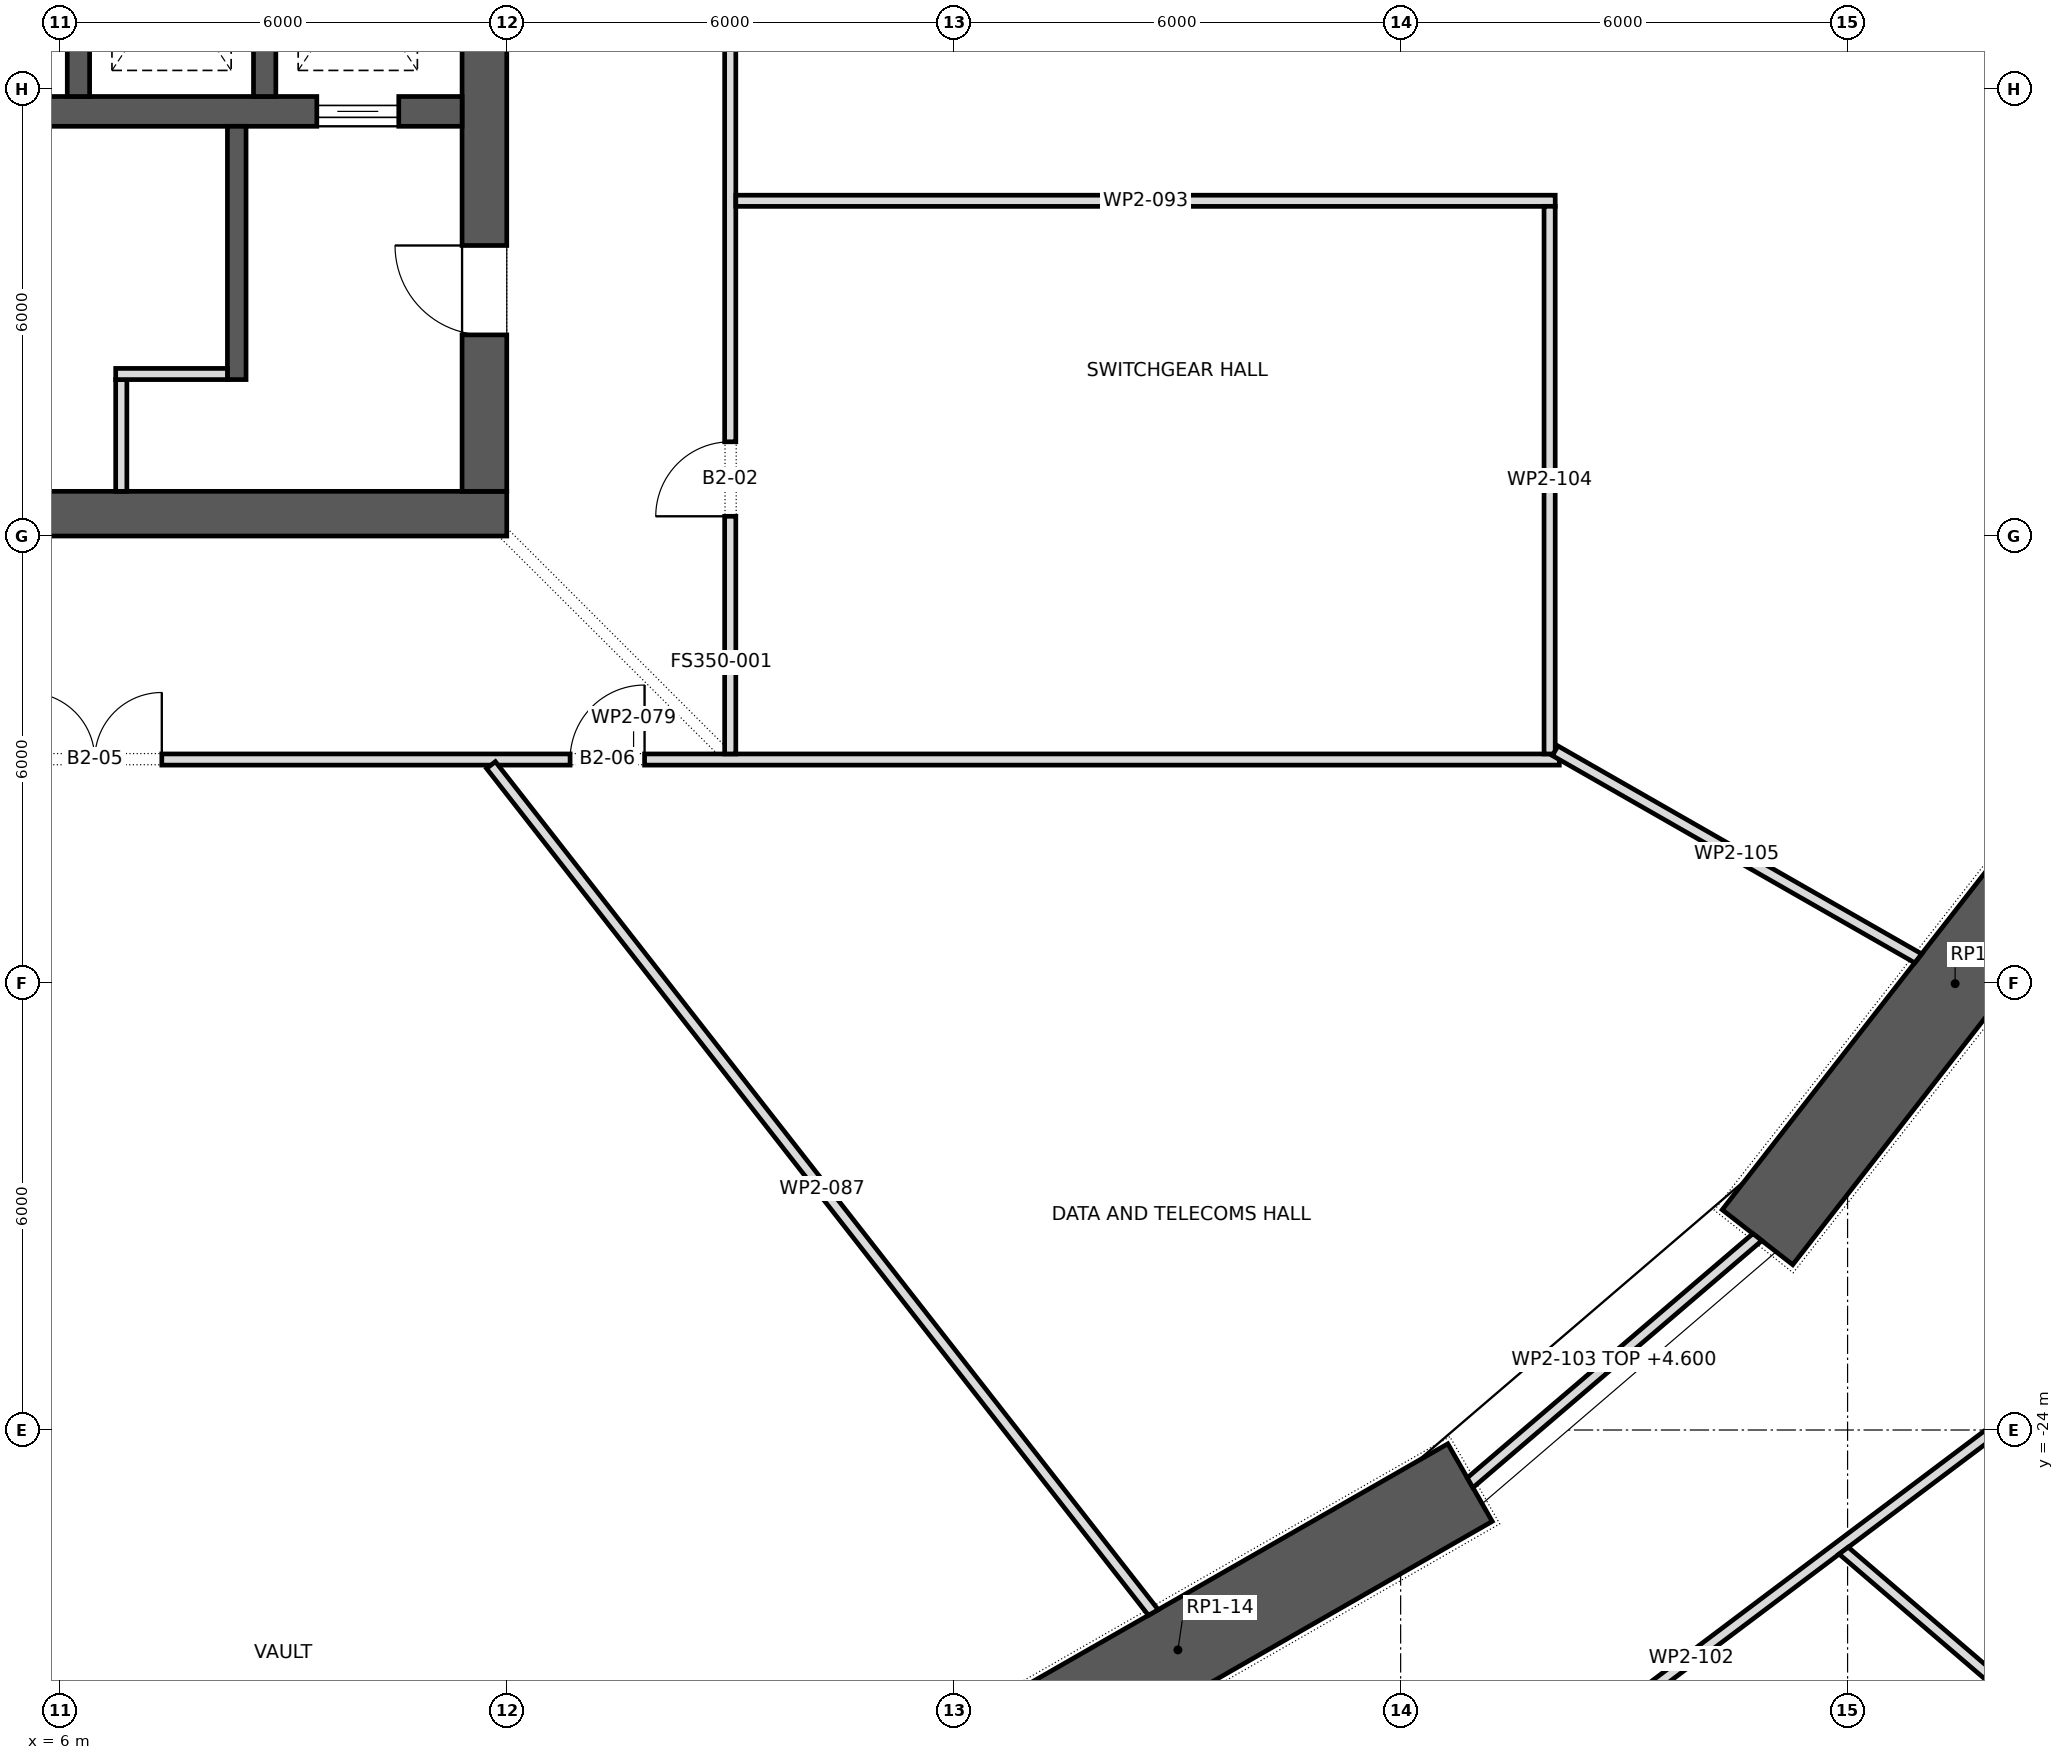
"""IFC4 building model, lengths in metres.
Left out: names, types, materials, properties, quantities, classifications, styles, units other than length and angle.
Written with IfcOpenShell. Run it as: python <this file> out.ifc"""

import sys

from ifc_helpers import new_model, si_unit, direction, frame, frame_2d, origin, place, context, subcontext, project, spatial, polyline, rectangle, outline, extrude, element, fill, save


model = new_model("IFC4")
c1 = context("Model", 3, precision=1e-05, world=origin(), true_north=direction((0.0, 1.0)))
c2 = subcontext(c1, "Body", "Model", "MODEL_VIEW")
j1 = project(units=[si_unit("LENGTHUNIT", "METRE"), si_unit("PLANEANGLEUNIT", "RADIAN")], contexts=[c1])
p1 = place(None, origin())
s1 = spatial("IfcSite", under=j1, at=p1, CompositionType="ELEMENT")
p2 = place(p1, origin())
s2 = spatial("IfcBuilding", under=s1, at=p2, CompositionType="ELEMENT")
p3 = place(p2, frame((0.0, 0.0, -9.5)))
s3 = spatial("IfcBuildingStorey", under=s2, at=p3, CompositionType="ELEMENT", Elevation=-9.5)
p4 = place(p3, frame((17.089, -29.198, 0.0), z_axis=(0.0, 0.0, 1.0), x_axis=(0.867760656864, 0.496982336103, 0.0)))
e1 = element("IfcWall", 1, at=p4, inside=s3, PredefinedType="SHEAR", context=c2, shape_type="SweptSolid", body=[
    extrude(rectangle(XDim=9.038, YDim=1.2, at=frame_2d((4.519, 0.0))), origin(), (0.0, 0.0, 1.0), 5.5),
])
p5 = place(p3, frame((28.79, -21.412, 0.0), z_axis=(0.0, 0.0, 1.0), x_axis=(0.614825322247, 0.788663314174, 0.0)))
e2 = element("IfcWall", 2, at=p5, inside=s3, PredefinedType="SHEAR", context=c2, shape_type="SweptSolid", body=[
    extrude(rectangle(XDim=8.632, YDim=1.2, at=frame_2d((4.316, 0.0))), origin(), (0.0, 0.0, 1.0), 5.5),
])
p6 = place(p3, frame((-12.0, -11.7, 0.0), z_axis=(0.0, 0.0, 1.0), x_axis=(1.0, 0.0, 0.0)))
e3 = element("IfcWall", 3, at=p6, inside=s3, PredefinedType="SHEAR", context=c2, shape_type="SweptSolid", body=[
    extrude(rectangle(XDim=24.0, YDim=0.6, at=frame_2d((12.0, 0.0))), origin(), (0.0, 0.0, 1.0), 5.5),
])
p7 = place(p6, frame((11.6, 0.0, 0.0)))
e4 = element("IfcOpeningElement", 4, at=p7, cuts=e3, PredefinedType="OPENING", context=c2, shape_type="SweptSolid", body=[
    extrude(rectangle(XDim=0.8, YDim=2.1, at=frame_2d((0.4, 1.05))), frame((0.0, 0.312, 0.0), z_axis=(0.0, -1.0, 0.0), x_axis=(1.0, 0.0, 0.0)), (0.0, 0.0, 1.0), 0.624),
])
p8 = place(p3, frame((11.7, -11.4, 0.0), z_axis=(0.0, 0.0, 1.0), x_axis=(0.0, 1.0, 0.0)))
e5 = element("IfcWall", 5, at=p8, inside=s3, PredefinedType="SHEAR", context=c2, shape_type="SweptSolid", body=[
    extrude(rectangle(XDim=22.8, YDim=0.6, at=frame_2d((11.4, 0.0))), origin(), (0.0, 0.0, 1.0), 5.5),
])
p9 = place(p8, frame((10.2, 0.0, 0.0)))
e6 = element("IfcOpeningElement", 6, at=p9, cuts=e5, PredefinedType="OPENING", context=c2, shape_type="SweptSolid", body=[
    extrude(rectangle(XDim=2.4, YDim=2.1, at=frame_2d((1.2, 1.05))), frame((0.0, 0.312, 0.0), z_axis=(0.0, -1.0, 0.0), x_axis=(1.0, 0.0, 0.0)), (0.0, 0.0, 1.0), 0.624),
])
p10 = place(p8, frame((19.5, 0.0, 0.0)))
e7 = element("IfcOpeningElement", 7, at=p10, cuts=e5, PredefinedType="OPENING", context=c2, shape_type="SweptSolid", body=[
    extrude(rectangle(XDim=1.2, YDim=2.1, at=frame_2d((0.6, 1.05))), frame((0.0, 0.312, 0.0), z_axis=(0.0, -1.0, 0.0), x_axis=(1.0, 0.0, 0.0)), (0.0, 0.0, 1.0), 0.624),
])
p11 = place(p8, frame((2.1, 0.0, 0.0)))
e8 = element("IfcOpeningElement", 8, at=p11, cuts=e5, PredefinedType="OPENING", context=c2, shape_type="SweptSolid", body=[
    extrude(rectangle(XDim=1.2, YDim=2.1, at=frame_2d((0.6, 1.05))), frame((0.0, 0.312, 0.0), z_axis=(0.0, -1.0, 0.0), x_axis=(1.0, 0.0, 0.0)), (0.0, 0.0, 1.0), 0.624),
])
p12 = place(p3, frame((-11.4, -6.3, 0.0), z_axis=(0.0, 0.0, 1.0), x_axis=(1.0, 0.0, 0.0)))
e9 = element("IfcWall", 9, at=p12, inside=s3, PredefinedType="SHEAR", context=c2, shape_type="SweptSolid", body=[
    extrude(rectangle(XDim=22.8, YDim=0.4, at=frame_2d((11.4, 0.0))), origin(), (0.0, 0.0, 1.0), 5.5),
])
p13 = place(p12, frame((20.85, 0.0, 0.0)))
e10 = element("IfcOpeningElement", 10, at=p13, cuts=e9, PredefinedType="OPENING", context=c2, shape_type="SweptSolid", body=[
    extrude(rectangle(XDim=1.1, YDim=2.1, at=frame_2d((0.55, 1.05))), frame((0.0, 0.212, 0.0), z_axis=(0.0, -1.0, 0.0), x_axis=(1.0, 0.0, 0.0)), (0.0, 0.0, 1.0), 0.424),
])
for number, where, z_axis, x_axis in (
    (11, (6.25, -6.1, 0.0), (0.0, 0.0, 1.0), (0.0, 1.0, 0.0)),
    (12, (8.75, -6.1, 0.0), (0.0, 0.0, 1.0), (0.0, 1.0, 0.0)),
):
    element("IfcWall", number, at=place(p3, frame(where, z_axis=z_axis, x_axis=x_axis)), inside=s3, PredefinedType="SHEAR", context=c2, shape_type="SweptSolid", body=[
        extrude(rectangle(XDim=2.9, YDim=0.3, at=frame_2d((1.45, 0.0))), origin(), (0.0, 0.0, 1.0), 5.5),
    ])
p14 = place(p3, frame((8.375, -9.9, 0.0), z_axis=(0.0, 0.0, 1.0), x_axis=(0.0, 1.0, 0.0)))
e13 = element("IfcWall", 13, at=p14, inside=s3, PredefinedType="SHEAR", context=c2, shape_type="SweptSolid", body=[
    extrude(rectangle(XDim=3.4, YDim=0.25, at=frame_2d((1.7, 0.0))), origin(), (0.0, 0.0, 1.0), 5.05),
])
for number, where, z_axis, x_axis in (
    (14, (6.825, -11.4, 0.0), (0.0, 0.0, 1.0), (0.0, 1.0, 0.0)),
    (15, (6.75, -9.825, 0.0), (0.0, 0.0, 1.0), (1.0, 0.0, 0.0)),
):
    element("IfcWall", number, at=place(p3, frame(where, z_axis=z_axis, x_axis=x_axis)), inside=s3, PredefinedType="PARTITIONING", context=c2, shape_type="SweptSolid", body=[
        extrude(rectangle(XDim=1.5, YDim=0.15, at=frame_2d((0.75, 0.0))), origin(), (0.0, 0.0, 1.0), 5.05),
    ])
p15 = place(p3, frame((1.275, -15.0, 0.0), z_axis=(0.0, 0.0, 1.0), x_axis=(1.0, 0.0, 0.0)))
e16 = element("IfcWall", 16, at=p15, inside=s3, PredefinedType="PARTITIONING", context=c2, shape_type="SweptSolid", body=[
    extrude(rectangle(XDim=24.855, YDim=0.15, at=frame_2d((12.427, 0.0))), origin(), (0.0, 0.0, 1.0), 5.05),
])
p16 = place(p15, frame((4.294, 0.0, 0.0)))
e17 = element("IfcOpeningElement", 17, at=p16, cuts=e16, PredefinedType="OPENING", context=c2, shape_type="SweptSolid", body=[
    extrude(rectangle(XDim=1.8, YDim=2.1, at=frame_2d((0.9, 1.05))), frame((0.0, 0.087, 0.0), z_axis=(0.0, -1.0, 0.0), x_axis=(1.0, 0.0, 0.0)), (0.0, 0.0, 1.0), 0.174),
])
p17 = place(p15, frame((11.575, 0.0, 0.0)))
e18 = element("IfcOpeningElement", 18, at=p17, cuts=e16, PredefinedType="OPENING", context=c2, shape_type="SweptSolid", body=[
    extrude(rectangle(XDim=1.0, YDim=2.1, at=frame_2d((0.5, 1.05))), frame((0.0, 0.087, 0.0), z_axis=(0.0, -1.0, 0.0), x_axis=(1.0, 0.0, 0.0)), (0.0, 0.0, 1.0), 0.174),
])
p18 = place(p3, frame((11.788, -15.074, 0.0), z_axis=(0.0, 0.0, 1.0), x_axis=(0.615848120598, -0.787864894735, 0.0)))
e19 = element("IfcWall", 19, at=p18, inside=s3, PredefinedType="PARTITIONING", context=c2, shape_type="SweptSolid", body=[
    extrude(outline(polyline([(0.0, -0.075), (14.428, -0.075), (14.449, 0.075), (0.0, 0.075), (0.0, -0.075)])), origin(), (0.0, 0.0, 1.0), 5.05),
])
p19 = place(p3, frame((15.0, -14.925, 0.0), z_axis=(0.0, 0.0, 1.0), x_axis=(0.0, 1.0, 0.0)))
e20 = element("IfcWall", 20, at=p19, inside=s3, PredefinedType="PARTITIONING", context=c2, shape_type="SweptSolid", body=[
    extrude(rectangle(XDim=29.85, YDim=0.15, at=frame_2d((14.925, 0.0))), origin(), (0.0, 0.0, 1.0), 5.05),
])
p20 = place(p19, frame((25.66, 0.0, 0.0)))
e21 = element("IfcOpeningElement", 21, at=p20, cuts=e20, PredefinedType="OPENING", context=c2, shape_type="SweptSolid", body=[
    extrude(rectangle(XDim=1.0, YDim=2.1, at=frame_2d((0.5, 1.05))), frame((0.0, 0.087, 0.0), z_axis=(0.0, -1.0, 0.0), x_axis=(1.0, 0.0, 0.0)), (0.0, 0.0, 1.0), 0.174),
])
p21 = place(p19, frame((3.19, 0.0, 0.0)))
e22 = element("IfcOpeningElement", 22, at=p21, cuts=e20, PredefinedType="OPENING", context=c2, shape_type="SweptSolid", body=[
    extrude(rectangle(XDim=1.0, YDim=2.1, at=frame_2d((0.5, 1.05))), frame((0.0, 0.087, 0.0), z_axis=(0.0, -1.0, 0.0), x_axis=(1.0, 0.0, 0.0)), (0.0, 0.0, 1.0), 0.174),
])
p22 = place(p19, frame((13.725, 0.0, 0.0)))
e23 = element("IfcOpeningElement", 23, at=p22, cuts=e20, PredefinedType="OPENING", context=c2, shape_type="SweptSolid", body=[
    extrude(rectangle(XDim=2.4, YDim=2.1, at=frame_2d((1.2, 1.05))), frame((0.0, 0.087, 0.0), z_axis=(0.0, -1.0, 0.0), x_axis=(1.0, 0.0, 0.0)), (0.0, 0.0, 1.0), 0.174),
])
p23 = place(p3, frame((15.075, -7.5, 0.0), z_axis=(0.0, 0.0, 1.0), x_axis=(1.0, 0.0, 0.0)))
e24 = element("IfcWall", 24, at=p23, inside=s3, PredefinedType="PARTITIONING", context=c2, shape_type="SweptSolid", body=[
    extrude(rectangle(XDim=11.0, YDim=0.15, at=frame_2d((5.5, 0.0))), origin(), (0.0, 0.0, 1.0), 5.05),
])
p24 = place(p3, frame((23.696, -30.228, 0.0), z_axis=(0.0, 0.0, 1.0), x_axis=(0.799195100787, 0.601071701944, 0.0)))
e25 = element("IfcWall", 25, at=p24, inside=s3, PredefinedType="PARTITIONING", context=c2, shape_type="SweptSolid", body=[
    extrude(rectangle(XDim=10.529, YDim=0.15, at=frame_2d((5.264, 0.0))), origin(), (0.0, 0.0, 1.0), 5.05),
])
p25 = place(p3, frame((24.932, -24.708, 0.0), z_axis=(0.0, 0.0, 1.0), x_axis=(0.760084552743, 0.649824185978, 0.0)))
e26 = element("IfcWall", 26, at=p25, inside=s3, PredefinedType="PARTITIONING", context=c2, shape_type="SweptSolid", body=[
    extrude(outline(polyline([(-0.014, -0.075), (5.09, -0.075), (5.06, 0.075), (0.014, 0.075), (-0.014, -0.075)])), origin(), (0.0, 0.0, 1.0), 4.6),
])
p26 = place(p3, frame((26.0, -14.925, 0.0), z_axis=(0.0, 0.0, 1.0), x_axis=(0.0, 1.0, 0.0)))
e27 = element("IfcWall", 27, at=p26, inside=s3, PredefinedType="PARTITIONING", context=c2, shape_type="SweptSolid", body=[
    extrude(rectangle(XDim=7.351, YDim=0.15, at=frame_2d((3.676, 0.0))), origin(), (0.0, 0.0, 1.0), 5.05),
])
p27 = place(p3, frame((26.074, -14.882, 0.0), z_axis=(0.0, 0.0, 1.0), x_axis=(0.868133416031, -0.496330909746, 0.0)))
e28 = element("IfcWall", 28, at=p27, inside=s3, PredefinedType="PARTITIONING", context=c2, shape_type="SweptSolid", body=[
    extrude(outline(polyline([(0.0, -0.075), (5.604, -0.075), (5.626, 0.075), (0.0, 0.075), (0.0, -0.075)])), origin(), (0.0, 0.0, 1.0), 5.05),
])
p28 = place(p3, frame((29.947, -25.619, 0.0), z_axis=(0.0, 0.0, 1.0), x_axis=(0.759265306208, -0.650781218836, 0.0)))
e29 = element("IfcWall", 29, at=p28, inside=s3, PredefinedType="PARTITIONING", context=c2, shape_type="SweptSolid", body=[
    extrude(outline(polyline([(-0.017, -0.075), (9.888, -0.075), (9.911, 0.075), (0.017, 0.075), (-0.017, -0.075)])), origin(), (0.0, 0.0, 1.0), 5.05),
])
p29 = place(p13, origin())
e30 = element("IfcDoor", 30, at=p29, inside=s3, OperationType="SLIDING_TO_LEFT", PredefinedType="DOOR", context=c2, shape_type="SweptSolid", body=[
    extrude(rectangle(XDim=1.1, YDim=2.1, at=frame_2d((0.55, 1.05))), frame((0.0, 0.025, 0.0), z_axis=(0.0, -1.0, 0.0), x_axis=(1.0, 0.0, 0.0)), (0.0, 0.0, 1.0), 0.05),
])
fill(e10, e30)
p30 = place(p11, origin())
e31 = element("IfcDoor", 31, at=p30, inside=s3, OperationType="SINGLE_SWING_LEFT", PredefinedType="DOOR", context=c2, shape_type="SweptSolid", body=[
    extrude(rectangle(XDim=1.2, YDim=2.1, at=frame_2d((0.6, 1.05))), frame((0.0, 0.025, 0.0), z_axis=(0.0, -1.0, 0.0), x_axis=(1.0, 0.0, 0.0)), (0.0, 0.0, 1.0), 0.05),
])
fill(e8, e31)
p31 = place(p21, origin())
e32 = element("IfcDoor", 32, at=p31, inside=s3, OperationType="SINGLE_SWING_RIGHT", PredefinedType="DOOR", context=c2, shape_type="SweptSolid", body=[
    extrude(rectangle(XDim=1.0, YDim=2.1, at=frame_2d((0.5, 1.05))), frame((0.0, 0.025, 0.0), z_axis=(0.0, -1.0, 0.0), x_axis=(1.0, 0.0, 0.0)), (0.0, 0.0, 1.0), 0.05),
])
fill(e22, e32)
p32 = place(p16, origin())
e33 = element("IfcDoor", 33, at=p32, inside=s3, OperationType="DOUBLE_DOOR_SINGLE_SWING", PredefinedType="DOOR", context=c2, shape_type="SweptSolid", body=[
    extrude(rectangle(XDim=1.8, YDim=2.1, at=frame_2d((0.9, 1.05))), frame((0.0, 0.025, 0.0), z_axis=(0.0, -1.0, 0.0), x_axis=(1.0, 0.0, 0.0)), (0.0, 0.0, 1.0), 0.05),
])
fill(e17, e33)
p33 = place(p17, origin())
e34 = element("IfcDoor", 34, at=p33, inside=s3, OperationType="SINGLE_SWING_LEFT", PredefinedType="DOOR", context=c2, shape_type="SweptSolid", body=[
    extrude(rectangle(XDim=1.0, YDim=2.1, at=frame_2d((0.5, 1.05))), frame((0.0, 0.025, 0.0), z_axis=(0.0, -1.0, 0.0), x_axis=(1.0, 0.0, 0.0)), (0.0, 0.0, 1.0), 0.05),
])
fill(e18, e34)
save(model, sys.argv[1])
